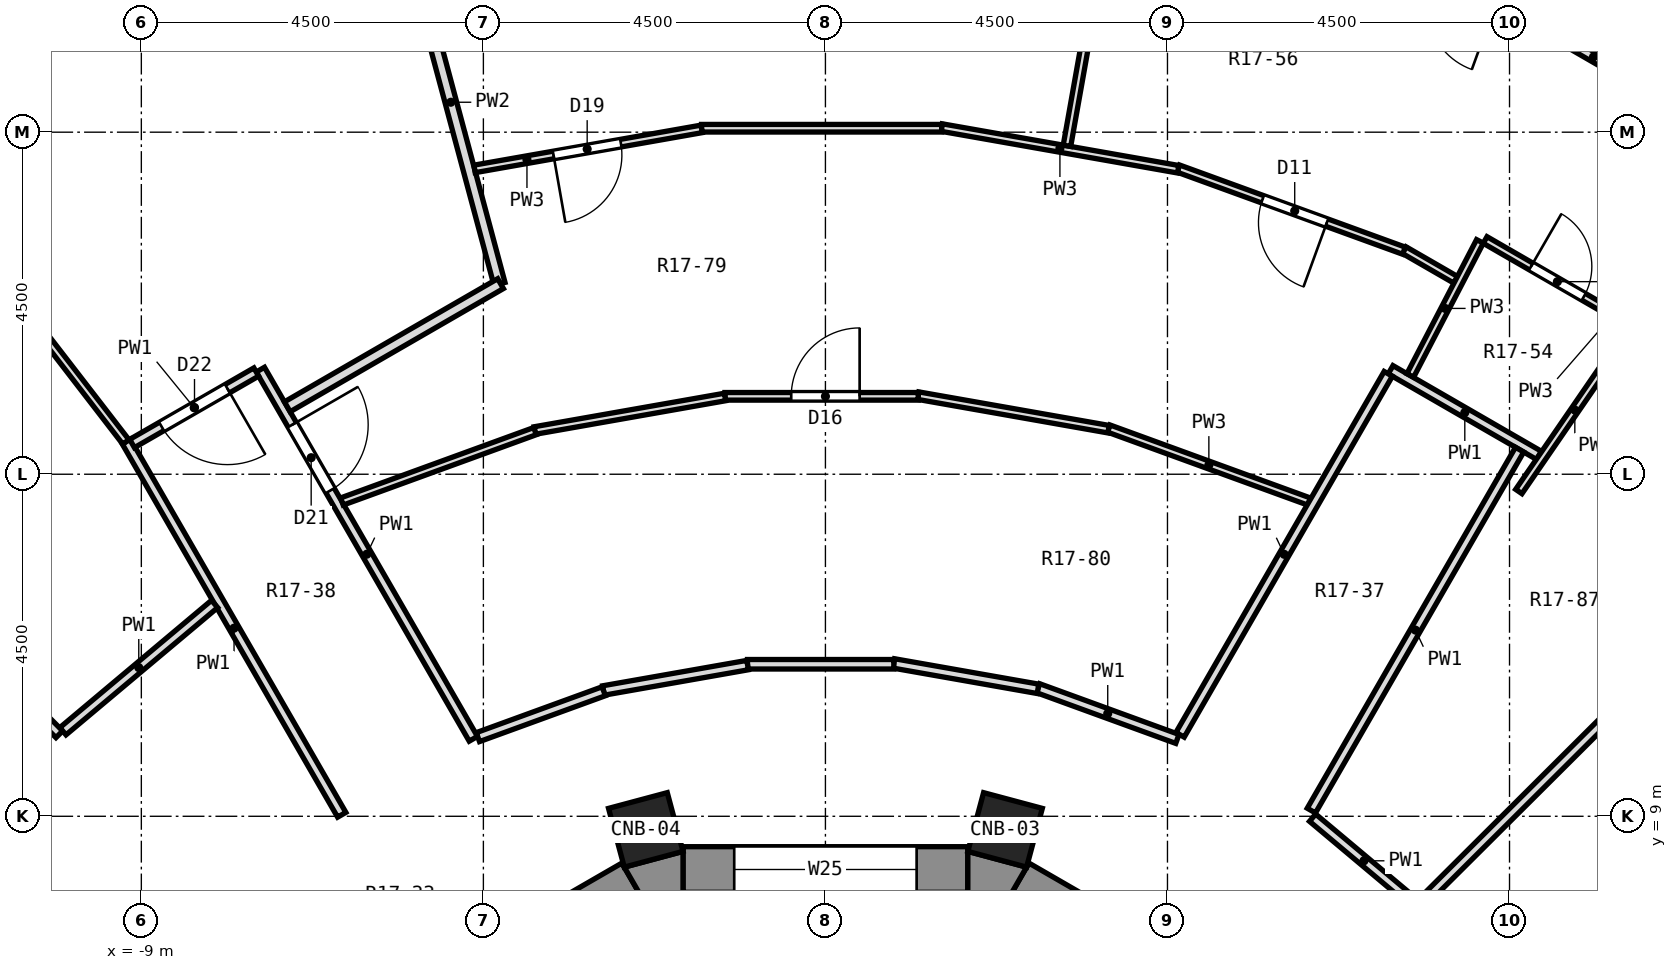
"""IFC4 building model, lengths in metres.
Left out: names, types, materials, properties, quantities, classifications, styles, units other than length and angle.
Written with IfcOpenShell. Run it as: python <this file> out.ifc"""

import sys

from ifc_helpers import new_model, si_unit, direction, frame, frame_2d, origin, origin_2d, place, context, subcontext, project, spatial, polyline, rectangle, outline, extrude, element, fill, save


model = new_model("IFC4")
c1 = context("Model", 3, precision=1e-05, world=origin(), true_north=direction((0.0, 1.0)))
c2 = subcontext(c1, "Body", "Model", "MODEL_VIEW")
j1 = project(units=[si_unit("LENGTHUNIT", "METRE"), si_unit("PLANEANGLEUNIT", "RADIAN")], contexts=[c1])
p1 = place(None, origin())
s1 = spatial("IfcSite", under=j1, at=p1, CompositionType="ELEMENT")
p2 = place(p1, origin())
s2 = spatial("IfcBuilding", under=s1, at=p2, CompositionType="ELEMENT")
p3 = place(p2, frame((0.0, 0.0, 91.9)))
s3 = spatial("IfcBuildingStorey", under=s2, at=p3, CompositionType="ELEMENT", Elevation=91.9)
for number, where, z_axis, x_axis in (
    (1, (2.364, 8.821, 0.0), (0.0, 0.0, 1.0), (0.259, 0.966, 0.0)),
    (2, (-2.364, 8.821, 0.0), (0.0, 0.0, 1.0), (-0.259, 0.966, 0.0)),
):
    element("IfcColumn", number, at=place(p3, frame(where, z_axis=z_axis, x_axis=x_axis)), inside=s3, PredefinedType="COLUMN", context=c2, shape_type="SweptSolid", body=[
        extrude(rectangle(XDim=0.8, YDim=0.8, at=origin_2d()), origin(), (0.0, 0.0, 1.0), 3.3),
    ])
p4 = place(p3, frame((5.773, 6.251, 0.0), z_axis=(0.0, 0.0, 1.0), x_axis=(-0.86604563398, 0.499964958637, 0.0)))
e3 = element("IfcWall", 3, at=p4, inside=s3, PredefinedType="SOLIDWALL", context=c2, shape_type="SweptSolid", body=[
    extrude(rectangle(XDim=3.747, YDim=0.6, at=frame_2d((1.874, 0.0))), origin(), (0.0, 0.0, 1.0), 2.8),
])
p5 = place(p4, frame((0.674, 0.0, 0.9)))
e4 = element("IfcOpeningElement", 4, at=p5, cuts=e3, PredefinedType="OPENING", context=c2, shape_type="SweptSolid", body=[
    extrude(rectangle(XDim=2.4, YDim=1.8, at=frame_2d((1.2, 0.9))), frame((0.0, 0.312, 0.0), z_axis=(0.0, -1.0, 0.0), x_axis=(1.0, 0.0, 0.0)), (0.0, 0.0, 1.0), 0.624),
])
p6 = place(p3, frame((1.874, 8.3, 0.0), z_axis=(0.0, 0.0, 1.0), x_axis=(-1.0, 0.0, 0.0)))
e5 = element("IfcWall", 5, at=p6, inside=s3, PredefinedType="SOLIDWALL", context=c2, shape_type="SweptSolid", body=[
    extrude(rectangle(XDim=3.748, YDim=0.6, at=frame_2d((1.874, 0.0))), origin(), (0.0, 0.0, 1.0), 2.8),
])
p7 = place(p6, frame((0.674, 0.0, 0.9)))
e6 = element("IfcOpeningElement", 6, at=p7, cuts=e5, PredefinedType="OPENING", context=c2, shape_type="SweptSolid", body=[
    extrude(rectangle(XDim=2.4, YDim=1.8, at=frame_2d((1.2, 0.9))), frame((0.0, 0.312, 0.0), z_axis=(0.0, -1.0, 0.0), x_axis=(1.0, 0.0, 0.0)), (0.0, 0.0, 1.0), 0.624),
])
p8 = place(p3, frame((-2.527, 8.125, 0.0), z_axis=(0.0, 0.0, 1.0), x_axis=(-0.86604563398, -0.499964958637, 0.0)))
e7 = element("IfcWall", 7, at=p8, inside=s3, PredefinedType="SOLIDWALL", context=c2, shape_type="SweptSolid", body=[
    extrude(rectangle(XDim=3.747, YDim=0.6, at=frame_2d((1.874, 0.0))), origin(), (0.0, 0.0, 1.0), 2.8),
])
p9 = place(p8, frame((0.674, 0.0, 0.9)))
e8 = element("IfcOpeningElement", 8, at=p9, cuts=e7, PredefinedType="OPENING", context=c2, shape_type="SweptSolid", body=[
    extrude(rectangle(XDim=2.4, YDim=1.8, at=frame_2d((1.2, 0.9))), frame((0.0, 0.312, 0.0), z_axis=(0.0, -1.0, 0.0), x_axis=(1.0, 0.0, 0.0)), (0.0, 0.0, 1.0), 0.624),
])
p10 = place(p3, origin())
e9 = element("IfcWall", 9, at=p10, inside=s3, PredefinedType="SOLIDWALL", context=c2, shape_type="SweptSolid", body=[
    extrude(outline(polyline([(1.874, 8.538), (1.874, 8.0), (2.377, 7.865), (2.646, 8.331), (1.874, 8.538)])), origin(), (0.0, 0.0, 1.0), 2.8),
])
p11 = place(p3, origin())
e10 = element("IfcWall", 10, at=p11, inside=s3, PredefinedType="SOLIDWALL", context=c2, shape_type="SweptSolid", body=[
    extrude(outline(polyline([(-2.646, 8.331), (-2.377, 7.865), (-1.874, 8.0), (-1.874, 8.538), (-2.646, 8.331)])), origin(), (0.0, 0.0, 1.0), 2.8),
])
p12 = place(p3, frame((-5.569, 20.784, 0.0), z_axis=(0.0, 0.0, 1.0), x_axis=(0.258810886784, -0.965928012267, 0.0)))
e11 = element("IfcWall", 11, at=p12, inside=s3, PredefinedType="PARTITIONING", context=c2, shape_type="SweptSolid", body=[
    extrude(rectangle(XDim=4.949, YDim=0.15, at=frame_2d((2.474, 0.0))), origin(), (0.0, 0.0, 1.0), 2.8),
])
p13 = place(p3, frame((-9.197, 13.93, 0.0), z_axis=(0.0, 0.0, 1.0), x_axis=(0.499811918813, -0.86613396528, 0.0)))
e12 = element("IfcWall", 12, at=p13, inside=s3, PredefinedType="PARTITIONING", context=c2, shape_type="SweptSolid", body=[
    extrude(rectangle(XDim=5.67, YDim=0.125, at=frame_2d((2.835, 0.0))), origin(), (0.0, 0.0, 1.0), 2.8),
])
p14 = place(p3, frame((-7.434, 14.876, 0.0), z_axis=(0.0, 0.0, 1.0), x_axis=(0.499750096908, -0.866169637335, 0.0)))
e13 = element("IfcWall", 13, at=p14, inside=s3, PredefinedType="PARTITIONING", context=c2, shape_type="SweptSolid", body=[
    extrude(rectangle(XDim=5.607, YDim=0.125, at=frame_2d((2.803, 0.0))), origin(), (0.0, 0.0, 1.0), 2.8),
])
p15 = place(p14, frame((0.837, 0.0, 0.0)))
e14 = element("IfcOpeningElement", 14, at=p15, cuts=e13, PredefinedType="OPENING", context=c2, shape_type="SweptSolid", body=[
    extrude(rectangle(XDim=1.0, YDim=2.1, at=frame_2d((0.5, 1.05))), frame((0.0, 0.074, 0.0), z_axis=(0.0, -1.0, 0.0), x_axis=(1.0, 0.0, 0.0)), (0.0, 0.0, 1.0), 0.149),
])
p16 = place(p3, frame((-14.694, 21.042, 0.0), z_axis=(0.0, 0.0, 1.0), x_axis=(0.610804913832, -0.79178112963, 0.0)))
e15 = element("IfcWall", 15, at=p16, inside=s3, PredefinedType="PARTITIONING", context=c2, shape_type="SweptSolid", body=[
    extrude(rectangle(XDim=8.989, YDim=0.1, at=frame_2d((4.494, 0.0))), origin(), (0.0, 0.0, 1.0), 2.8),
])
p17 = place(p3, frame((-13.079, 13.079, 0.0), z_axis=(0.0, 0.0, 1.0), x_axis=(0.707106781187, -0.707106781187, 0.0)))
e16 = element("IfcWall", 16, at=p17, inside=s3, PredefinedType="PARTITIONING", context=c2, shape_type="SweptSolid", body=[
    extrude(rectangle(XDim=4.242, YDim=0.125, at=frame_2d((2.121, 0.0))), origin(), (0.0, 0.0, 1.0), 2.8),
])
p18 = place(p3, frame((6.409, 8.981, 0.0), z_axis=(0.0, 0.0, 1.0), x_axis=(0.766209131969, -0.642591290081, 0.0)))
e17 = element("IfcWall", 17, at=p18, inside=s3, PredefinedType="PARTITIONING", context=c2, shape_type="SweptSolid", body=[
    extrude(rectangle(XDim=1.764, YDim=0.125, at=frame_2d((0.882, 0.0))), origin(), (0.0, 0.0, 1.0), 2.8),
])
p19 = place(p3, frame((7.436, 14.875, 0.0), z_axis=(0.0, 0.0, 1.0), x_axis=(0.866028691075, -0.499994306202, 0.0)))
e18 = element("IfcWall", 18, at=p19, inside=s3, PredefinedType="PARTITIONING", context=c2, shape_type="SweptSolid", body=[
    extrude(rectangle(XDim=2.254, YDim=0.125, at=frame_2d((1.127, 0.0))), origin(), (0.0, 0.0, 1.0), 2.8),
])
p20 = place(p3, frame((7.614, 16.449, 0.0), z_axis=(0.0, 0.0, 1.0), x_axis=(0.866201164306, -0.499695450205, 0.0)))
e19 = element("IfcWall", 19, at=p20, inside=s3, PredefinedType="PARTITIONING", context=c2, shape_type="SweptSolid", body=[
    extrude(rectangle(XDim=0.783, YDim=0.1, at=frame_2d((0.391, 0.0))), origin(), (0.0, 0.0, 1.0), 2.8),
])
p21 = place(p3, frame((8.679, 16.582, 0.0), z_axis=(0.0, 0.0, 1.0), x_axis=(0.866122264928, -0.499832194037, 0.0)))
e20 = element("IfcWall", 20, at=p21, inside=s3, PredefinedType="PARTITIONING", context=c2, shape_type="SweptSolid", body=[
    extrude(rectangle(XDim=2.247, YDim=0.1, at=frame_2d((1.124, 0.0))), origin(), (0.0, 0.0, 1.0), 2.8),
])
p22 = place(p21, frame((0.698, 0.0, 0.0)))
e21 = element("IfcOpeningElement", 21, at=p22, cuts=e20, PredefinedType="OPENING", context=c2, shape_type="SweptSolid", body=[
    extrude(rectangle(XDim=0.8, YDim=2.1, at=frame_2d((0.4, 1.05))), frame((0.0, 0.062, 0.0), z_axis=(0.0, -1.0, 0.0), x_axis=(1.0, 0.0, 0.0)), (0.0, 0.0, 1.0), 0.124),
])
p23 = place(p3, frame((9.065, 19.59, 0.0), z_axis=(0.0, 0.0, 1.0), x_axis=(0.865961876044, -0.500110017135, 0.0)))
e22 = element("IfcWall", 22, at=p23, inside=s3, PredefinedType="PARTITIONING", context=c2, shape_type="SweptSolid", body=[
    extrude(rectangle(XDim=3.762, YDim=0.125, at=frame_2d((1.881, 0.0))), origin(), (0.0, 0.0, 1.0), 2.8),
])
p24 = place(p23, frame((1.494, 0.0, 0.0)))
e23 = element("IfcOpeningElement", 23, at=p24, cuts=e22, PredefinedType="OPENING", context=c2, shape_type="SweptSolid", body=[
    extrude(rectangle(XDim=0.9, YDim=2.1, at=frame_2d((0.45, 1.05))), frame((0.0, 0.074, 0.0), z_axis=(0.0, -1.0, 0.0), x_axis=(1.0, 0.0, 0.0)), (0.0, 0.0, 1.0), 0.149),
])
p25 = place(p3, frame((2.798, 10.685, 0.0), z_axis=(0.0, 0.0, 1.0), x_axis=(0.939595877431, -0.342285826635, 0.0)))
e24 = element("IfcWall", 24, at=p25, inside=s3, PredefinedType="PARTITIONING", context=c2, shape_type="SweptSolid", body=[
    extrude(rectangle(XDim=1.95, YDim=0.125, at=frame_2d((0.975, 0.0))), origin(), (0.0, 0.0, 1.0), 2.8),
])
p26 = place(p3, frame((3.726, 14.101, 0.0), z_axis=(0.0, 0.0, 1.0), x_axis=(0.939597715072, -0.342280782152, 0.0)))
e25 = element("IfcWall", 25, at=p26, inside=s3, PredefinedType="PARTITIONING", context=c2, shape_type="SweptSolid", body=[
    extrude(rectangle(XDim=2.807, YDim=0.1, at=frame_2d((1.403, 0.0))), origin(), (0.0, 0.0, 1.0), 2.8),
])
p27 = place(p3, frame((4.642, 17.521, 0.0), z_axis=(0.0, 0.0, 1.0), x_axis=(0.939739258447, -0.341891980211, 0.0)))
e26 = element("IfcWall", 26, at=p27, inside=s3, PredefinedType="PARTITIONING", context=c2, shape_type="SweptSolid", body=[
    extrude(rectangle(XDim=3.159, YDim=0.1, at=frame_2d((1.58, 0.0))), origin(), (0.0, 0.0, 1.0), 2.8),
])
p28 = place(p27, frame((1.18, 0.0, 0.0)))
e27 = element("IfcOpeningElement", 27, at=p28, cuts=e26, PredefinedType="OPENING", context=c2, shape_type="SweptSolid", body=[
    extrude(rectangle(XDim=0.9, YDim=2.1, at=frame_2d((0.45, 1.05))), frame((0.0, 0.062, 0.0), z_axis=(0.0, -1.0, 0.0), x_axis=(1.0, 0.0, 0.0)), (0.0, 0.0, 1.0), 0.124),
])
p29 = place(p3, frame((0.899, 11.011, 0.0), z_axis=(0.0, 0.0, 1.0), x_axis=(0.984830733923, -0.173517795977, 0.0)))
e28 = element("IfcWall", 28, at=p29, inside=s3, PredefinedType="PARTITIONING", context=c2, shape_type="SweptSolid", body=[
    extrude(rectangle(XDim=1.926, YDim=0.125, at=frame_2d((0.963, 0.0))), origin(), (0.0, 0.0, 1.0), 2.8),
])
p30 = place(p3, frame((1.221, 14.534, 0.0), z_axis=(0.0, 0.0, 1.0), x_axis=(0.98484729526, -0.173423772937, 0.0)))
e29 = element("IfcWall", 29, at=p30, inside=s3, PredefinedType="PARTITIONING", context=c2, shape_type="SweptSolid", body=[
    extrude(rectangle(XDim=2.542, YDim=0.1, at=frame_2d((1.271, 0.0))), origin(), (0.0, 0.0, 1.0), 2.8),
])
p31 = place(p3, frame((1.529, 18.061, 0.0), z_axis=(0.0, 0.0, 1.0), x_axis=(0.984824759837, -0.173551699537, 0.0)))
e30 = element("IfcWall", 30, at=p31, inside=s3, PredefinedType="PARTITIONING", context=c2, shape_type="SweptSolid", body=[
    extrude(rectangle(XDim=3.159, YDim=0.1, at=frame_2d((1.58, 0.0))), origin(), (0.0, 0.0, 1.0), 2.8),
])
p32 = place(p3, frame((-1.025, 11.0, 0.0), z_axis=(0.0, 0.0, 1.0), x_axis=(1.0, 0.0, 0.0)))
e31 = element("IfcWall", 31, at=p32, inside=s3, PredefinedType="PARTITIONING", context=c2, shape_type="SweptSolid", body=[
    extrude(rectangle(XDim=1.925, YDim=0.125, at=frame_2d((0.962, 0.0))), origin(), (0.0, 0.0, 1.0), 2.8),
])
p33 = place(p3, frame((-1.322, 14.525, 0.0), z_axis=(0.0, 0.0, 1.0), x_axis=(1.0, 0.0, 0.0)))
e32 = element("IfcWall", 32, at=p33, inside=s3, PredefinedType="PARTITIONING", context=c2, shape_type="SweptSolid", body=[
    extrude(rectangle(XDim=2.543, YDim=0.1, at=frame_2d((1.271, 0.0))), origin(), (0.0, 0.0, 1.0), 2.8),
])
p34 = place(p33, frame((0.872, 0.0, 0.0)))
e33 = element("IfcOpeningElement", 33, at=p34, cuts=e32, PredefinedType="OPENING", context=c2, shape_type="SweptSolid", body=[
    extrude(rectangle(XDim=0.9, YDim=2.1, at=frame_2d((0.45, 1.05))), frame((0.0, 0.062, 0.0), z_axis=(0.0, -1.0, 0.0), x_axis=(1.0, 0.0, 0.0)), (0.0, 0.0, 1.0), 0.124),
])
p35 = place(p3, frame((-1.63, 18.052, 0.0), z_axis=(0.0, 0.0, 1.0), x_axis=(1.0, 0.0, 0.0)))
e34 = element("IfcWall", 34, at=p35, inside=s3, PredefinedType="PARTITIONING", context=c2, shape_type="SweptSolid", body=[
    extrude(rectangle(XDim=3.159, YDim=0.1, at=frame_2d((1.58, 0.0))), origin(), (0.0, 0.0, 1.0), 2.8),
])
p36 = place(p3, frame((-2.92, 10.655, 0.0), z_axis=(0.0, 0.0, 1.0), x_axis=(0.98482691703, 0.173539458027, 0.0)))
e35 = element("IfcWall", 35, at=p36, inside=s3, PredefinedType="PARTITIONING", context=c2, shape_type="SweptSolid", body=[
    extrude(rectangle(XDim=1.926, YDim=0.125, at=frame_2d((0.963, 0.0))), origin(), (0.0, 0.0, 1.0), 2.8),
])
p37 = place(p3, frame((-3.824, 14.075, 0.0), z_axis=(0.0, 0.0, 1.0), x_axis=(0.984827998664, 0.173533319706, 0.0)))
e36 = element("IfcWall", 36, at=p37, inside=s3, PredefinedType="PARTITIONING", context=c2, shape_type="SweptSolid", body=[
    extrude(rectangle(XDim=2.542, YDim=0.1, at=frame_2d((1.271, 0.0))), origin(), (0.0, 0.0, 1.0), 2.8),
])
p38 = place(p3, frame((-4.616, 17.517, 0.0), z_axis=(0.0, 0.0, 1.0), x_axis=(0.984849913621, 0.173408903003, 0.0)))
e37 = element("IfcWall", 37, at=p38, inside=s3, PredefinedType="PARTITIONING", context=c2, shape_type="SweptSolid", body=[
    extrude(rectangle(XDim=3.034, YDim=0.1, at=frame_2d((1.517, 0.0))), origin(), (0.0, 0.0, 1.0), 2.8),
])
p39 = place(p38, frame((1.054, 0.0, 0.0)))
e38 = element("IfcOpeningElement", 38, at=p39, cuts=e37, PredefinedType="OPENING", context=c2, shape_type="SweptSolid", body=[
    extrude(rectangle(XDim=0.9, YDim=2.1, at=frame_2d((0.45, 1.05))), frame((0.0, 0.062, 0.0), z_axis=(0.0, -1.0, 0.0), x_axis=(1.0, 0.0, 0.0)), (0.0, 0.0, 1.0), 0.124),
])
p40 = place(p3, frame((-4.572, 10.042, 0.0), z_axis=(0.0, 0.0, 1.0), x_axis=(0.939578855371, 0.342332549635, 0.0)))
e39 = element("IfcWall", 39, at=p40, inside=s3, PredefinedType="PARTITIONING", context=c2, shape_type="SweptSolid", body=[
    extrude(rectangle(XDim=1.762, YDim=0.125, at=frame_2d((0.881, 0.0))), origin(), (0.0, 0.0, 1.0), 2.8),
])
p41 = place(p3, frame((-6.361, 13.141, 0.0), z_axis=(0.0, 0.0, 1.0), x_axis=(0.939569098227, 0.342359328275, 0.0)))
e40 = element("IfcWall", 40, at=p41, inside=s3, PredefinedType="PARTITIONING", context=c2, shape_type="SweptSolid", body=[
    extrude(rectangle(XDim=2.703, YDim=0.1, at=frame_2d((1.352, 0.0))), origin(), (0.0, 0.0, 1.0), 2.8),
])
p42 = place(p3, frame((-9.122, 13.904, 0.0), z_axis=(0.0, 0.0, 1.0), x_axis=(0.866620759959, 0.498967392128, 0.0)))
e41 = element("IfcWall", 41, at=p42, inside=s3, PredefinedType="PARTITIONING", context=c2, shape_type="SweptSolid", body=[
    extrude(rectangle(XDim=1.885, YDim=0.125, at=frame_2d((0.943, 0.0))), origin(), (0.0, 0.0, 1.0), 2.8),
])
p43 = place(p42, frame((0.448, 0.0, 0.0)))
e42 = element("IfcOpeningElement", 42, at=p43, cuts=e41, PredefinedType="OPENING", context=c2, shape_type="SweptSolid", body=[
    extrude(rectangle(XDim=1.0, YDim=2.1, at=frame_2d((0.5, 1.05))), frame((0.0, 0.074, 0.0), z_axis=(0.0, -1.0, 0.0), x_axis=(1.0, 0.0, 0.0)), (0.0, 0.0, 1.0), 0.149),
])
p44 = place(p3, frame((-7.08, 14.387, 0.0), z_axis=(0.0, 0.0, 1.0), x_axis=(0.865957178428, 0.500118151169, 0.0)))
e43 = element("IfcWall", 43, at=p44, inside=s3, PredefinedType="PARTITIONING", context=c2, shape_type="SweptSolid", body=[
    extrude(rectangle(XDim=3.24, YDim=0.15, at=frame_2d((1.62, 0.0))), origin(), (0.0, 0.0, 1.0), 2.8),
])
p45 = place(p3, frame((-10.031, 10.119, 0.0), z_axis=(0.0, 0.0, 1.0), x_axis=(0.766096242005, 0.642725873126, 0.0)))
e44 = element("IfcWall", 44, at=p45, inside=s3, PredefinedType="PARTITIONING", context=c2, shape_type="SweptSolid", body=[
    extrude(rectangle(XDim=2.604, YDim=0.125, at=frame_2d((1.302, 0.0))), origin(), (0.0, 0.0, 1.0), 2.8),
])
p46 = place(p3, frame((7.844, 7.861, 0.0), z_axis=(0.0, 0.0, 1.0), x_axis=(0.708356490253, 0.705854859526, 0.0)))
e45 = element("IfcWall", 45, at=p46, inside=s3, PredefinedType="PARTITIONING", context=c2, shape_type="SweptSolid", body=[
    extrude(rectangle(XDim=7.417, YDim=0.125, at=frame_2d((3.708, 0.0))), origin(), (0.0, 0.0, 1.0), 2.8),
])
p47 = place(p3, frame((9.122, 13.272, 0.0), z_axis=(0.0, 0.0, 1.0), x_axis=(0.566405338298, 0.82412680623, 0.0)))
e46 = element("IfcWall", 46, at=p47, inside=s3, PredefinedType="PARTITIONING", context=c2, shape_type="SweptSolid", body=[
    extrude(rectangle(XDim=2.601, YDim=0.1, at=frame_2d((1.301, 0.0))), origin(), (0.0, 0.0, 1.0), 2.8),
])
p48 = place(p3, frame((6.393, 9.075, 0.0), z_axis=(0.0, 0.0, 1.0), x_axis=(0.499717313028, 0.866188551679, 0.0)))
e47 = element("IfcWall", 47, at=p48, inside=s3, PredefinedType="PARTITIONING", context=c2, shape_type="SweptSolid", body=[
    extrude(rectangle(XDim=5.482, YDim=0.125, at=frame_2d((2.741, 0.0))), origin(), (0.0, 0.0, 1.0), 2.8),
])
p49 = place(p3, frame((4.666, 10.072, 0.0), z_axis=(0.0, 0.0, 1.0), x_axis=(0.499564368271, 0.866276769834, 0.0)))
e48 = element("IfcWall", 48, at=p49, inside=s3, PredefinedType="PARTITIONING", context=c2, shape_type="SweptSolid", body=[
    extrude(rectangle(XDim=5.482, YDim=0.125, at=frame_2d((2.741, 0.0))), origin(), (0.0, 0.0, 1.0), 2.8),
])
p50 = place(p3, frame((7.694, 14.8, 0.0), z_axis=(0.0, 0.0, 1.0), x_axis=(0.461012435149, 0.887393675117, 0.0)))
e49 = element("IfcWall", 49, at=p50, inside=s3, PredefinedType="PARTITIONING", context=c2, shape_type="SweptSolid", body=[
    extrude(rectangle(XDim=1.988, YDim=0.1, at=frame_2d((0.994, 0.0))), origin(), (0.0, 0.0, 1.0), 2.8),
])
p51 = place(p3, frame((3.178, 17.821, 0.0), z_axis=(0.0, 0.0, 1.0), x_axis=(0.175313184309, 0.984512715716, 0.0)))
e50 = element("IfcWall", 50, at=p51, inside=s3, PredefinedType="PARTITIONING", context=c2, shape_type="SweptSolid", body=[
    extrude(rectangle(XDim=3.345, YDim=0.1, at=frame_2d((1.672, 0.0))), origin(), (0.0, 0.0, 1.0), 2.8),
])
p52 = place(p7, origin())
e51 = element("IfcWindow", 51, at=p52, inside=s3, PartitioningType="SINGLE_PANEL", PredefinedType="WINDOW", context=c2, shape_type="SweptSolid", body=[
    extrude(rectangle(XDim=2.4, YDim=1.8, at=frame_2d((1.2, 0.9))), frame((0.0, -0.12, 0.0), z_axis=(0.0, -1.0, 0.0), x_axis=(1.0, 0.0, 0.0)), (0.0, 0.0, 1.0), 0.06),
])
fill(e6, e51)
p53 = place(p22, origin())
e52 = element("IfcDoor", 52, at=p53, inside=s3, OperationType="SINGLE_SWING_LEFT", PredefinedType="DOOR", context=c2, shape_type="SweptSolid", body=[
    extrude(rectangle(XDim=0.8, YDim=2.1, at=frame_2d((0.4, 1.05))), frame((0.0, 0.025, 0.0), z_axis=(0.0, -1.0, 0.0), x_axis=(1.0, 0.0, 0.0)), (0.0, 0.0, 1.0), 0.05),
])
fill(e21, e52)
p54 = place(p28, frame((0.9, 0.0, 0.0), z_axis=(0.0, 0.0, 1.0), x_axis=(-1.0, 0.0, 0.0)))
e53 = element("IfcDoor", 53, at=p54, inside=s3, OperationType="SINGLE_SWING_LEFT", PredefinedType="DOOR", context=c2, shape_type="SweptSolid", body=[
    extrude(rectangle(XDim=0.9, YDim=2.1, at=frame_2d((0.45, 1.05))), frame((0.0, 0.025, 0.0), z_axis=(0.0, -1.0, 0.0), x_axis=(1.0, 0.0, 0.0)), (0.0, 0.0, 1.0), 0.05),
])
fill(e27, e53)
p55 = place(p34, origin())
e54 = element("IfcDoor", 54, at=p55, inside=s3, OperationType="SINGLE_SWING_RIGHT", PredefinedType="DOOR", context=c2, shape_type="SweptSolid", body=[
    extrude(rectangle(XDim=0.9, YDim=2.1, at=frame_2d((0.45, 1.05))), frame((0.0, 0.025, 0.0), z_axis=(0.0, -1.0, 0.0), x_axis=(1.0, 0.0, 0.0)), (0.0, 0.0, 1.0), 0.05),
])
fill(e33, e54)
p56 = place(p39, frame((0.9, 0.0, 0.0), z_axis=(0.0, 0.0, 1.0), x_axis=(-1.0, 0.0, 0.0)))
e55 = element("IfcDoor", 55, at=p56, inside=s3, OperationType="SINGLE_SWING_RIGHT", PredefinedType="DOOR", context=c2, shape_type="SweptSolid", body=[
    extrude(rectangle(XDim=0.9, YDim=2.1, at=frame_2d((0.45, 1.05))), frame((0.0, 0.025, 0.0), z_axis=(0.0, -1.0, 0.0), x_axis=(1.0, 0.0, 0.0)), (0.0, 0.0, 1.0), 0.05),
])
fill(e38, e55)
p57 = place(p15, origin())
e56 = element("IfcDoor", 56, at=p57, inside=s3, OperationType="SINGLE_SWING_LEFT", PredefinedType="DOOR", context=c2, shape_type="SweptSolid", body=[
    extrude(rectangle(XDim=1.0, YDim=2.1, at=frame_2d((0.5, 1.05))), frame((0.0, 0.025, 0.0), z_axis=(0.0, -1.0, 0.0), x_axis=(1.0, 0.0, 0.0)), (0.0, 0.0, 1.0), 0.05),
])
fill(e14, e56)
p58 = place(p43, frame((1.0, 0.0, 0.0), z_axis=(0.0, 0.0, 1.0), x_axis=(-1.0, 0.0, 0.0)))
e57 = element("IfcDoor", 57, at=p58, inside=s3, OperationType="SINGLE_SWING_LEFT", PredefinedType="DOOR", context=c2, shape_type="SweptSolid", body=[
    extrude(rectangle(XDim=1.0, YDim=2.1, at=frame_2d((0.5, 1.05))), frame((0.0, 0.025, 0.0), z_axis=(0.0, -1.0, 0.0), x_axis=(1.0, 0.0, 0.0)), (0.0, 0.0, 1.0), 0.05),
])
fill(e42, e57)
save(model, sys.argv[1])
